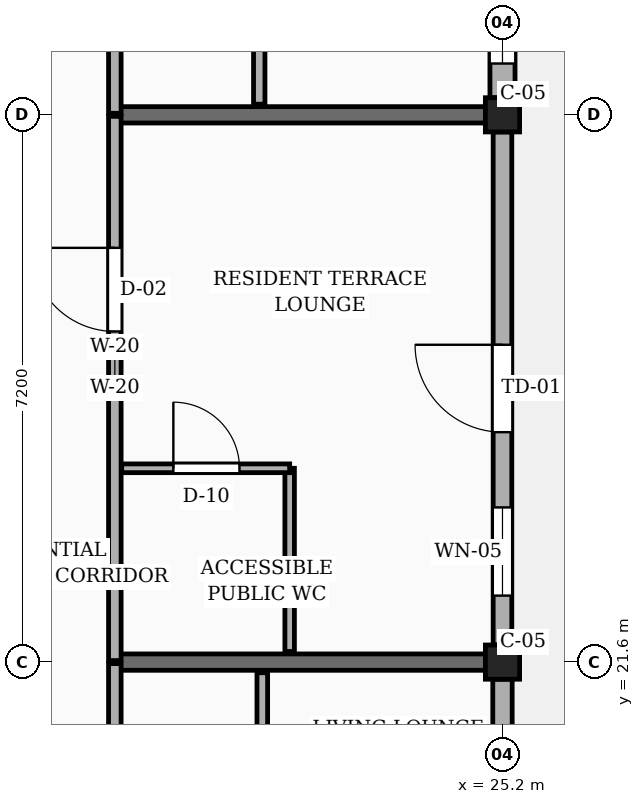
"""IFC4 building model, lengths in metres.
Left out: names, types, materials, properties, quantities, classifications, styles, units other than length and angle.
Written with IfcOpenShell. Run it as: python <this file> out.ifc"""

import sys

from ifc_helpers import new_model, si_unit, direction, frame, frame_2d, origin, origin_2d, place, context, subcontext, project, spatial, rectangle, extrude, element, fill, save


model = new_model("IFC4")
c1 = context("Model", 3, precision=1e-05, world=origin(), true_north=direction((0.0, 1.0)))
c2 = subcontext(c1, "Body", "Model", "MODEL_VIEW")
j1 = project(units=[si_unit("LENGTHUNIT", "METRE"), si_unit("PLANEANGLEUNIT", "RADIAN")], contexts=[c1])
p1 = place(None, origin())
s1 = spatial("IfcSite", under=j1, at=p1, CompositionType="ELEMENT")
p2 = place(p1, origin())
s2 = spatial("IfcBuilding", under=s1, at=p2, CompositionType="ELEMENT")
p3 = place(p2, frame((0.0, 0.0, 36.0)))
s3 = spatial("IfcBuildingStorey", under=s2, at=p3, CompositionType="ELEMENT", Elevation=36.0)
for number, where, z_axis, x_axis in (
    (1, (25.2, 21.6, 0.0), (0.0, 0.0, 1.0), (1.0, 0.0, 0.0)),
    (2, (25.2, 28.8, 0.0), (0.0, 0.0, 1.0), (1.0, 0.0, 0.0)),
):
    element("IfcColumn", number, at=place(p3, frame(where, z_axis=z_axis, x_axis=x_axis)), inside=s3, PredefinedType="COLUMN", context=c2, shape_type="SweptSolid", body=[
        extrude(rectangle(XDim=0.45, YDim=0.45, at=origin_2d()), origin(), (0.0, 0.0, 1.0), 3.15),
    ])
for number, where, z_axis, x_axis in (
    (3, (20.1, 21.6, 0.0), (0.0, 0.0, 1.0), (1.0, 0.0, 0.0)),
    (4, (20.1, 28.8, 0.0), (0.0, 0.0, 1.0), (1.0, 0.0, 0.0)),
):
    element("IfcWall", number, at=place(p3, frame(where, z_axis=z_axis, x_axis=x_axis)), inside=s3, PredefinedType="SOLIDWALL", context=c2, shape_type="SweptSolid", body=[
        extrude(rectangle(XDim=4.875, YDim=0.215, at=frame_2d((2.438, 0.0))), origin(), (0.0, 0.0, 1.0), 2.17),
    ])
p4 = place(p3, frame((25.2, 14.625, 0.0), z_axis=(0.0, 0.0, 1.0), x_axis=(0.0, 1.0, 0.0)))
e5 = element("IfcWall", 5, at=p4, inside=s3, PredefinedType="SOLIDWALL", context=c2, shape_type="SweptSolid", body=[
    extrude(rectangle(XDim=6.75, YDim=0.255, at=frame_2d((3.375, 0.0))), origin(), (0.0, 0.0, 1.0), 2.44),
])
p5 = place(p4, frame((0.45, 0.0, 0.78)))
e6 = element("IfcOpeningElement", 6, at=p5, cuts=e5, PredefinedType="OPENING", context=c2, shape_type="SweptSolid", body=[
    extrude(rectangle(XDim=1.05, YDim=1.44, at=frame_2d((0.525, 0.72))), frame((0.0, 0.137, 0.0), z_axis=(0.0, -1.0, 0.0), x_axis=(1.0, 0.0, 0.0)), (0.0, 0.0, 1.0), 0.275),
])
p6 = place(p4, frame((4.65, 0.0, 0.78)))
e7 = element("IfcOpeningElement", 7, at=p6, cuts=e5, PredefinedType="OPENING", context=c2, shape_type="SweptSolid", body=[
    extrude(rectangle(XDim=1.25, YDim=1.44, at=frame_2d((0.625, 0.72))), frame((0.0, 0.137, 0.0), z_axis=(0.0, -1.0, 0.0), x_axis=(1.0, 0.0, 0.0)), (0.0, 0.0, 1.0), 0.275),
])
p7 = place(p3, frame((25.2, 21.825, 0.0), z_axis=(0.0, 0.0, 1.0), x_axis=(0.0, 1.0, 0.0)))
e8 = element("IfcWall", 8, at=p7, inside=s3, PredefinedType="SOLIDWALL", context=c2, shape_type="SweptSolid", body=[
    extrude(rectangle(XDim=6.75, YDim=0.245, at=frame_2d((3.375, 0.0))), origin(), (0.0, 0.0, 1.0), 2.44),
])
p8 = place(p7, frame((2.8, 0.0, 0.0)))
e9 = element("IfcOpeningElement", 9, at=p8, cuts=e8, PredefinedType="OPENING", context=c2, shape_type="SweptSolid", body=[
    extrude(rectangle(XDim=1.15, YDim=2.12, at=frame_2d((0.575, 1.06))), frame((0.0, 0.133, 0.0), z_axis=(0.0, -1.0, 0.0), x_axis=(1.0, 0.0, 0.0)), (0.0, 0.0, 1.0), 0.265),
])
p9 = place(p7, frame((0.65, 0.0, 0.78)))
e10 = element("IfcOpeningElement", 10, at=p9, cuts=e8, PredefinedType="OPENING", context=c2, shape_type="SweptSolid", body=[
    extrude(rectangle(XDim=1.16, YDim=1.15, at=frame_2d((0.58, 0.575))), frame((0.0, 0.133, 0.0), z_axis=(0.0, -1.0, 0.0), x_axis=(1.0, 0.0, 0.0)), (0.0, 0.0, 1.0), 0.265),
])
p10 = place(p3, frame((25.2, 29.025, 0.0), z_axis=(0.0, 0.0, 1.0), x_axis=(0.0, 1.0, 0.0)))
e11 = element("IfcWall", 11, at=p10, inside=s3, PredefinedType="SOLIDWALL", context=c2, shape_type="SweptSolid", body=[
    extrude(rectangle(XDim=6.75, YDim=0.33, at=frame_2d((3.375, 0.0))), origin(), (0.0, 0.0, 1.0), 2.44),
])
p11 = place(p10, frame((0.45, 0.0, 0.78)))
e12 = element("IfcOpeningElement", 12, at=p11, cuts=e11, PredefinedType="OPENING", context=c2, shape_type="SweptSolid", body=[
    extrude(rectangle(XDim=1.35, YDim=1.44, at=frame_2d((0.675, 0.72))), frame((0.0, 0.175, 0.0), z_axis=(0.0, -1.0, 0.0), x_axis=(1.0, 0.0, 0.0)), (0.0, 0.0, 1.0), 0.35),
])
p12 = place(p10, frame((4.65, 0.0, 0.78)))
e13 = element("IfcOpeningElement", 13, at=p12, cuts=e11, PredefinedType="OPENING", context=c2, shape_type="SweptSolid", body=[
    extrude(rectangle(XDim=0.85, YDim=1.15, at=frame_2d((0.425, 0.575))), frame((0.0, 0.175, 0.0), z_axis=(0.0, -1.0, 0.0), x_axis=(1.0, 0.0, 0.0)), (0.0, 0.0, 1.0), 0.35),
])
p13 = place(p3, frame((20.1, 14.42, 0.0), z_axis=(0.0, 0.0, 1.0), x_axis=(0.0, 1.0, 0.0)))
e14 = element("IfcWall", 14, at=p13, inside=s3, PredefinedType="PARTITIONING", context=c2, shape_type="SweptSolid", body=[
    extrude(rectangle(XDim=7.16, YDim=0.165, at=frame_2d((3.58, 0.0))), origin(), (0.0, 0.0, 1.0), 2.305),
])
p14 = place(p13, frame((4.78, 0.0, 0.0)))
e15 = element("IfcOpeningElement", 15, at=p14, cuts=e14, PredefinedType="OPENING", context=c2, shape_type="SweptSolid", body=[
    extrude(rectangle(XDim=1.14, YDim=2.18, at=frame_2d((0.57, 1.09))), frame((0.0, 0.093, 0.0), z_axis=(0.0, -1.0, 0.0), x_axis=(1.0, 0.0, 0.0)), (0.0, 0.0, 1.0), 0.185),
])
p15 = place(p3, frame((20.1, 21.62, 0.0), z_axis=(0.0, 0.0, 1.0), x_axis=(0.0, 1.0, 0.0)))
e16 = element("IfcWall", 16, at=p15, inside=s3, PredefinedType="PARTITIONING", context=c2, shape_type="SweptSolid", body=[
    extrude(rectangle(XDim=7.16, YDim=0.165, at=frame_2d((3.58, 0.0))), origin(), (0.0, 0.0, 1.0), 2.305),
])
p16 = place(p15, frame((4.33, 0.0, 0.0)))
e17 = element("IfcOpeningElement", 17, at=p16, cuts=e16, PredefinedType="OPENING", context=c2, shape_type="SweptSolid", body=[
    extrude(rectangle(XDim=1.1, YDim=2.15, at=frame_2d((0.55, 1.075))), frame((0.0, 0.093, 0.0), z_axis=(0.0, -1.0, 0.0), x_axis=(1.0, 0.0, 0.0)), (0.0, 0.0, 1.0), 0.185),
])
p17 = place(p3, frame((20.1, 28.82, 0.0), z_axis=(0.0, 0.0, 1.0), x_axis=(0.0, 1.0, 0.0)))
e18 = element("IfcWall", 18, at=p17, inside=s3, PredefinedType="PARTITIONING", context=c2, shape_type="SweptSolid", body=[
    extrude(rectangle(XDim=7.16, YDim=0.165, at=frame_2d((3.58, 0.0))), origin(), (0.0, 0.0, 1.0), 2.305),
])
p18 = place(p17, frame((4.78, 0.0, 0.0)))
e19 = element("IfcOpeningElement", 19, at=p18, cuts=e18, PredefinedType="OPENING", context=c2, shape_type="SweptSolid", body=[
    extrude(rectangle(XDim=0.94, YDim=2.12, at=frame_2d((0.47, 1.06))), frame((0.0, 0.093, 0.0), z_axis=(0.0, -1.0, 0.0), x_axis=(1.0, 0.0, 0.0)), (0.0, 0.0, 1.0), 0.185),
])
p19 = place(p3, frame((22.04, 14.54, 0.0), z_axis=(0.0, 0.0, 1.0), x_axis=(0.0, 1.0, 0.0)))
e20 = element("IfcWall", 20, at=p19, inside=s3, PredefinedType="PARTITIONING", context=c2, shape_type="SweptSolid", body=[
    extrude(rectangle(XDim=6.92, YDim=0.14, at=frame_2d((3.46, 0.0))), origin(), (0.0, 0.0, 1.0), 2.305),
])
p20 = place(p19, frame((4.66, 0.0, 0.0)))
e21 = element("IfcOpeningElement", 21, at=p20, cuts=e20, PredefinedType="OPENING", context=c2, shape_type="SweptSolid", body=[
    extrude(rectangle(XDim=0.92, YDim=2.1, at=frame_2d((0.46, 1.05))), frame((0.0, 0.08, 0.0), z_axis=(0.0, -1.0, 0.0), x_axis=(1.0, 0.0, 0.0)), (0.0, 0.0, 1.0), 0.16),
])
p21 = place(p3, frame((22.4, 21.74, 0.0), z_axis=(0.0, 0.0, 1.0), x_axis=(0.0, 1.0, 0.0)))
e22 = element("IfcWall", 22, at=p21, inside=s3, PredefinedType="PARTITIONING", context=c2, shape_type="SweptSolid", body=[
    extrude(rectangle(XDim=2.41, YDim=0.125, at=frame_2d((1.205, 0.0))), origin(), (0.0, 0.0, 1.0), 2.305),
])
p22 = place(p3, frame((20.19, 24.15, 0.0), z_axis=(0.0, 0.0, 1.0), x_axis=(1.0, 0.0, 0.0)))
e23 = element("IfcWall", 23, at=p22, inside=s3, PredefinedType="PARTITIONING", context=c2, shape_type="SweptSolid", body=[
    extrude(rectangle(XDim=2.21, YDim=0.115, at=frame_2d((1.105, 0.0))), origin(), (0.0, 0.0, 1.0), 2.305),
])
p23 = place(p22, frame((0.68, 0.0, 0.0)))
e24 = element("IfcOpeningElement", 24, at=p23, cuts=e23, PredefinedType="OPENING", context=c2, shape_type="SweptSolid", body=[
    extrude(rectangle(XDim=0.87, YDim=2.05, at=frame_2d((0.435, 1.025))), frame((0.0, 0.067, 0.0), z_axis=(0.0, -1.0, 0.0), x_axis=(1.0, 0.0, 0.0)), (0.0, 0.0, 1.0), 0.135),
])
p24 = place(p3, frame((22.0, 28.94, 0.0), z_axis=(0.0, 0.0, 1.0), x_axis=(0.0, 1.0, 0.0)))
e25 = element("IfcWall", 25, at=p24, inside=s3, PredefinedType="PARTITIONING", context=c2, shape_type="SweptSolid", body=[
    extrude(rectangle(XDim=6.92, YDim=0.15, at=frame_2d((3.46, 0.0))), origin(), (0.0, 0.0, 1.0), 2.305),
])
p25 = place(p24, frame((4.66, 0.0, 0.0)))
e26 = element("IfcOpeningElement", 26, at=p25, cuts=e25, PredefinedType="OPENING", context=c2, shape_type="SweptSolid", body=[
    extrude(rectangle(XDim=0.92, YDim=2.1, at=frame_2d((0.46, 1.05))), frame((0.0, 0.085, 0.0), z_axis=(0.0, -1.0, 0.0), x_axis=(1.0, 0.0, 0.0)), (0.0, 0.0, 1.0), 0.17),
])
p26 = place(p8, frame((1.15, 0.0, 0.0), z_axis=(0.0, 0.0, 1.0), x_axis=(-1.0, 0.0, 0.0)))
e27 = element("IfcDoor", 27, at=p26, inside=s3, OperationType="SINGLE_SWING_RIGHT", PredefinedType="DOOR", context=c2, shape_type="SweptSolid", body=[
    extrude(rectangle(XDim=1.15, YDim=2.12, at=frame_2d((0.575, 1.06))), frame((0.0, 0.025, 0.0), z_axis=(0.0, -1.0, 0.0), x_axis=(1.0, 0.0, 0.0)), (0.0, 0.0, 1.0), 0.05),
])
fill(e9, e27)
p27 = place(p9, origin())
e28 = element("IfcWindow", 28, at=p27, inside=s3, PartitioningType="SINGLE_PANEL", PredefinedType="WINDOW", context=c2, shape_type="SweptSolid", body=[
    extrude(rectangle(XDim=1.16, YDim=1.15, at=frame_2d((0.58, 0.575))), frame((0.0, 0.03, 0.0), z_axis=(0.0, -1.0, 0.0), x_axis=(1.0, 0.0, 0.0)), (0.0, 0.0, 1.0), 0.06),
])
fill(e10, e28)
p28 = place(p11, origin())
e29 = element("IfcWindow", 29, at=p28, inside=s3, PartitioningType="SINGLE_PANEL", PredefinedType="WINDOW", context=c2, shape_type="SweptSolid", body=[
    extrude(rectangle(XDim=1.35, YDim=1.44, at=frame_2d((0.675, 0.72))), frame((0.0, 0.03, 0.0), z_axis=(0.0, -1.0, 0.0), x_axis=(1.0, 0.0, 0.0)), (0.0, 0.0, 1.0), 0.06),
])
fill(e12, e29)
p29 = place(p16, origin())
e30 = element("IfcDoor", 30, at=p29, inside=s3, OperationType="SINGLE_SWING_RIGHT", PredefinedType="DOOR", context=c2, shape_type="SweptSolid", body=[
    extrude(rectangle(XDim=1.1, YDim=2.15, at=frame_2d((0.55, 1.075))), frame((0.0, 0.025, 0.0), z_axis=(0.0, -1.0, 0.0), x_axis=(1.0, 0.0, 0.0)), (0.0, 0.0, 1.0), 0.05),
])
fill(e17, e30)
p30 = place(p23, origin())
e31 = element("IfcDoor", 31, at=p30, inside=s3, OperationType="SINGLE_SWING_LEFT", PredefinedType="DOOR", context=c2, shape_type="SweptSolid", body=[
    extrude(rectangle(XDim=0.87, YDim=2.05, at=frame_2d((0.435, 1.025))), frame((0.0, 0.025, 0.0), z_axis=(0.0, -1.0, 0.0), x_axis=(1.0, 0.0, 0.0)), (0.0, 0.0, 1.0), 0.05),
])
fill(e24, e31)
save(model, sys.argv[1])
